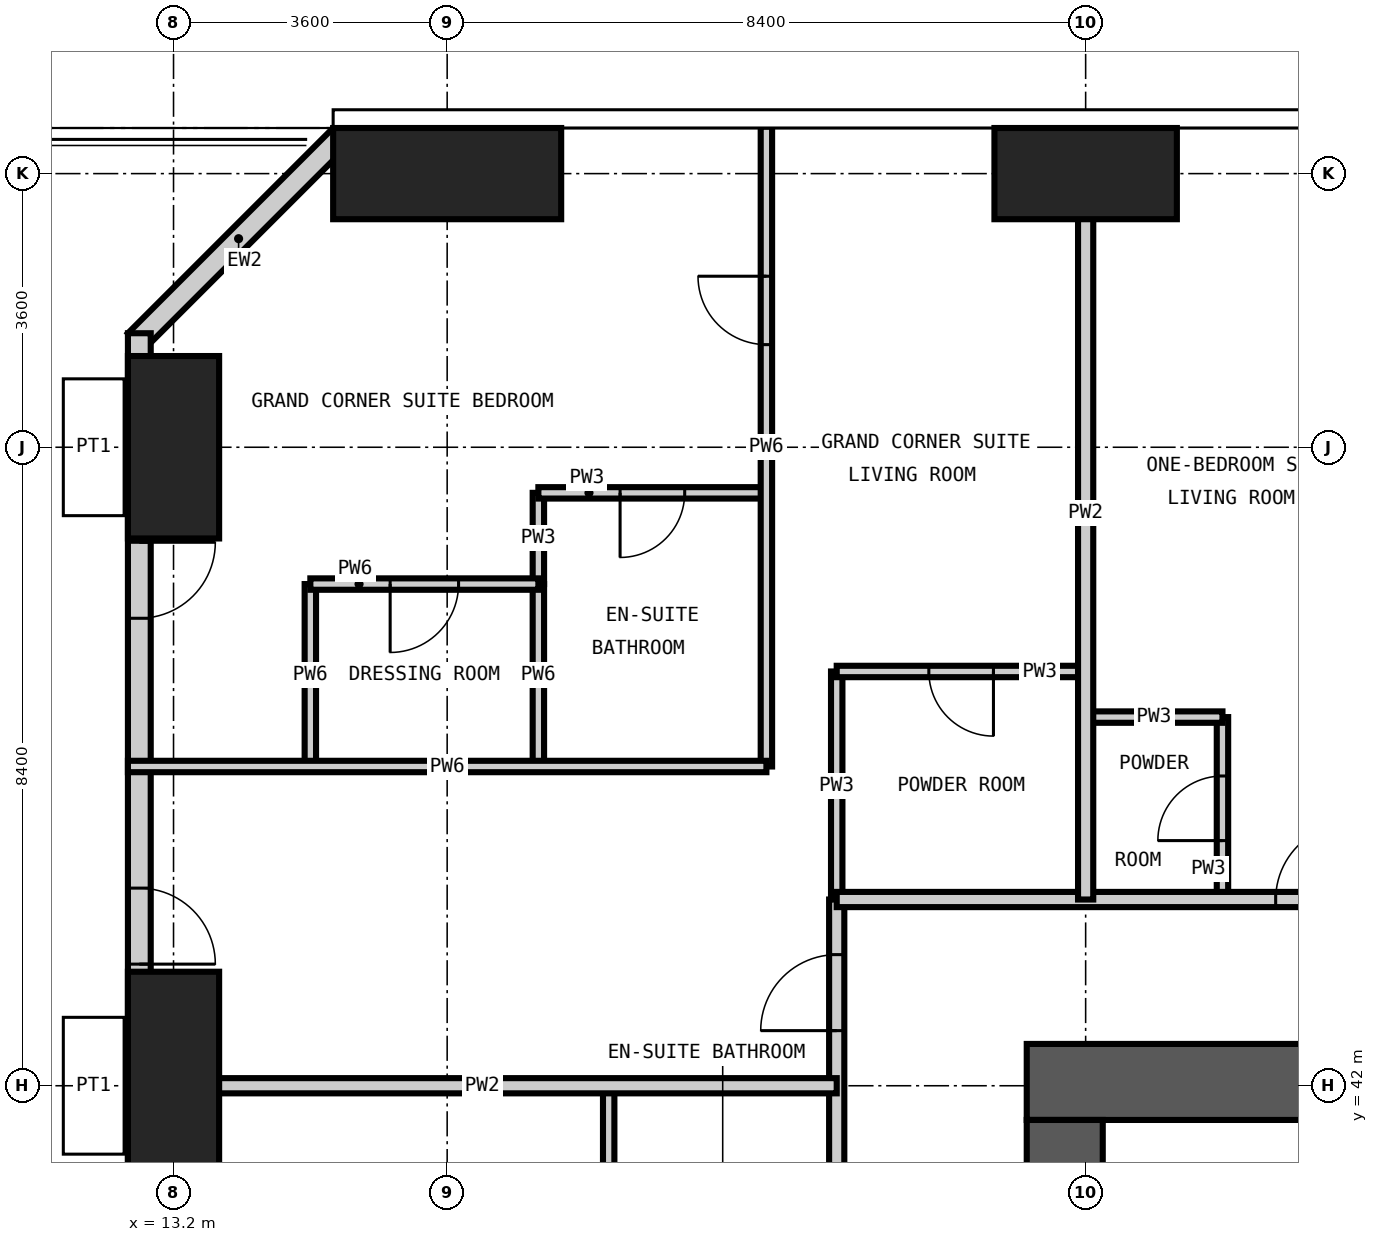
"""IFC4 building model, lengths in metres.
Left out: names, types, materials, properties, quantities, classifications, styles, units other than length and angle.
Written with IfcOpenShell. Run it as: python <this file> out.ifc"""

import sys

from ifc_helpers import new_model, si_unit, direction, frame, frame_2d, origin, origin_2d, place, context, subcontext, project, spatial, rectangle, extrude, element, fill, save


model = new_model("IFC4")
c1 = context("Model", 3, precision=1e-05, world=origin(), true_north=direction((0.0, 1.0)))
c2 = subcontext(c1, "Body", "Model", "MODEL_VIEW")
j1 = project(units=[si_unit("LENGTHUNIT", "METRE"), si_unit("PLANEANGLEUNIT", "RADIAN")], contexts=[c1])
p1 = place(None, origin())
s1 = spatial("IfcSite", under=j1, at=p1, CompositionType="ELEMENT")
p2 = place(p1, origin())
s2 = spatial("IfcBuilding", under=s1, at=p2, CompositionType="ELEMENT")
p3 = place(p2, frame((0.0, 0.0, 225.6)))
s3 = spatial("IfcBuildingStorey", under=s2, at=p3, CompositionType="ELEMENT", Elevation=225.6)
p4 = place(p3, frame((13.2, 42.0, -0.35), z_axis=(0.0, 0.0, 1.0), x_axis=(1.0, 0.0, 0.0)))
e1 = element("IfcColumn", 1, at=p4, inside=s3, PredefinedType="COLUMN", context=c2, shape_type="SweptSolid", body=[
    extrude(rectangle(XDim=1.2, YDim=3.0, at=origin_2d()), origin(), (0.0, 0.0, 1.0), 3.9),
])
p5 = place(p3, frame((13.2, 50.4, -0.35), z_axis=(0.0, 0.0, 1.0), x_axis=(1.0, 0.0, 0.0)))
e2 = element("IfcColumn", 2, at=p5, inside=s3, PredefinedType="COLUMN", context=c2, shape_type="SweptSolid", body=[
    extrude(rectangle(XDim=1.2, YDim=2.4, at=origin_2d()), origin(), (0.0, 0.0, 1.0), 3.9),
])
p6 = place(p3, frame((16.8, 54.0, -0.35), z_axis=(0.0, 0.0, 1.0), x_axis=(1.0, 0.0, 0.0)))
e3 = element("IfcColumn", 3, at=p6, inside=s3, PredefinedType="COLUMN", context=c2, shape_type="SweptSolid", body=[
    extrude(rectangle(XDim=3.0, YDim=1.2, at=origin_2d()), origin(), (0.0, 0.0, 1.0), 3.9),
])
p7 = place(p3, frame((25.2, 54.0, -0.35), z_axis=(0.0, 0.0, 1.0), x_axis=(1.0, 0.0, 0.0)))
e4 = element("IfcColumn", 4, at=p7, inside=s3, PredefinedType="COLUMN", context=c2, shape_type="SweptSolid", body=[
    extrude(rectangle(XDim=2.4, YDim=1.2, at=origin_2d()), origin(), (0.0, 0.0, 1.0), 3.9),
])
p8 = place(p3, frame((42.55, 42.05, -0.35), z_axis=(0.0, 0.0, 1.0), x_axis=(-1.0, 0.0, 0.0)))
e5 = element("IfcWall", 5, at=p8, inside=s3, PredefinedType="SHEAR", context=c2, shape_type="SweptSolid", body=[
    extrude(rectangle(XDim=18.125, YDim=1.0, at=frame_2d((9.062, 0.0))), origin(), (0.0, 0.0, 1.0), 3.9),
])
p9 = place(p8, frame((10.45, 0.0, 0.35)))
e6 = element("IfcOpeningElement", 6, at=p9, cuts=e5, PredefinedType="OPENING", context=c2, shape_type="SweptSolid", body=[
    extrude(rectangle(XDim=1.2, YDim=2.2, at=frame_2d((0.6, 1.1))), frame((0.0, 0.51, 0.0), z_axis=(0.0, -1.0, 0.0), x_axis=(1.0, 0.0, 0.0)), (0.0, 0.0, 1.0), 1.02),
])
p10 = place(p3, frame((24.925, 41.55, -0.35), z_axis=(0.0, 0.0, 1.0), x_axis=(0.0, -1.0, 0.0)))
e7 = element("IfcWall", 7, at=p10, inside=s3, PredefinedType="SHEAR", context=c2, shape_type="SweptSolid", body=[
    extrude(rectangle(XDim=24.3, YDim=1.0, at=frame_2d((12.15, 0.0))), origin(), (0.0, 0.0, 1.0), 3.9),
])
p11 = place(p10, frame((11.65, 0.0, 0.35)))
e8 = element("IfcOpeningElement", 8, at=p11, cuts=e7, PredefinedType="OPENING", context=c2, shape_type="SweptSolid", body=[
    extrude(rectangle(XDim=1.0, YDim=2.1, at=frame_2d((0.5, 1.05))), frame((0.0, 0.51, 0.0), z_axis=(0.0, -1.0, 0.0), x_axis=(1.0, 0.0, 0.0)), (0.0, 0.0, 1.0), 1.02),
])
p12 = place(p3, frame((15.406, 54.494, 0.0), z_axis=(0.0, 0.0, 1.0), x_axis=(-0.707106781187, -0.707106781187, 0.0)))
e9 = element("IfcWall", 9, at=p12, inside=s3, PredefinedType="SOLIDWALL", context=c2, shape_type="SweptSolid", body=[
    extrude(rectangle(XDim=3.818, YDim=0.3, at=frame_2d((1.909, 0.0))), origin(), (0.0, 0.0, 1.0), 3.55),
])
p13 = place(p3, frame((12.75, 51.9, 0.0), z_axis=(0.0, 0.0, 1.0), x_axis=(0.0, -1.0, 0.0)))
e10 = element("IfcWall", 10, at=p13, inside=s3, PredefinedType="SOLIDWALL", context=c2, shape_type="SweptSolid", body=[
    extrude(rectangle(XDim=45.0, YDim=0.3, at=frame_2d((22.5, 0.0))), origin(), (0.0, 0.0, 1.0), 3.1),
])
p14 = place(p13, frame((41.25, 0.0, 0.0)))
e11 = element("IfcOpeningElement", 11, at=p14, cuts=e10, PredefinedType="OPENING", context=c2, shape_type="SweptSolid", body=[
    extrude(rectangle(XDim=1.0, YDim=2.4, at=frame_2d((0.5, 1.2))), frame((0.0, 0.16, 0.0), z_axis=(0.0, -1.0, 0.0), x_axis=(1.0, 0.0, 0.0)), (0.0, 0.0, 1.0), 0.32),
])
p15 = place(p13, frame((36.7, 0.0, 0.0)))
e12 = element("IfcOpeningElement", 12, at=p15, cuts=e10, PredefinedType="OPENING", context=c2, shape_type="SweptSolid", body=[
    extrude(rectangle(XDim=1.0, YDim=2.4, at=frame_2d((0.5, 1.2))), frame((0.0, 0.16, 0.0), z_axis=(0.0, -1.0, 0.0), x_axis=(1.0, 0.0, 0.0)), (0.0, 0.0, 1.0), 0.32),
])
p16 = place(p13, frame((30.4, 0.0, 0.0)))
e13 = element("IfcOpeningElement", 13, at=p16, cuts=e10, PredefinedType="OPENING", context=c2, shape_type="SweptSolid", body=[
    extrude(rectangle(XDim=1.0, YDim=2.4, at=frame_2d((0.5, 1.2))), frame((0.0, 0.16, 0.0), z_axis=(0.0, -1.0, 0.0), x_axis=(1.0, 0.0, 0.0)), (0.0, 0.0, 1.0), 0.32),
])
p17 = place(p13, frame((31.7, 0.0, 0.6)))
e14 = element("IfcOpeningElement", 14, at=p17, cuts=e10, PredefinedType="OPENING", context=c2, shape_type="SweptSolid", body=[
    extrude(rectangle(XDim=1.8, YDim=2.1, at=frame_2d((0.9, 1.05))), frame((0.0, 0.16, 0.0), z_axis=(0.0, -1.0, 0.0), x_axis=(1.0, 0.0, 0.0)), (0.0, 0.0, 1.0), 0.32),
])
p18 = place(p13, frame((28.0, 0.0, 0.6)))
e15 = element("IfcOpeningElement", 15, at=p18, cuts=e10, PredefinedType="OPENING", context=c2, shape_type="SweptSolid", body=[
    extrude(rectangle(XDim=1.8, YDim=2.1, at=frame_2d((0.9, 1.05))), frame((0.0, 0.16, 0.0), z_axis=(0.0, -1.0, 0.0), x_axis=(1.0, 0.0, 0.0)), (0.0, 0.0, 1.0), 0.32),
])
p19 = place(p13, frame((24.1, 0.0, 0.0)))
e16 = element("IfcOpeningElement", 16, at=p19, cuts=e10, PredefinedType="OPENING", context=c2, shape_type="SweptSolid", body=[
    extrude(rectangle(XDim=1.0, YDim=2.4, at=frame_2d((0.5, 1.2))), frame((0.0, 0.16, 0.0), z_axis=(0.0, -1.0, 0.0), x_axis=(1.0, 0.0, 0.0)), (0.0, 0.0, 1.0), 0.32),
])
p20 = place(p13, frame((19.9, 0.0, 0.0)))
e17 = element("IfcOpeningElement", 17, at=p20, cuts=e10, PredefinedType="OPENING", context=c2, shape_type="SweptSolid", body=[
    extrude(rectangle(XDim=1.0, YDim=2.4, at=frame_2d((0.5, 1.2))), frame((0.0, 0.16, 0.0), z_axis=(0.0, -1.0, 0.0), x_axis=(1.0, 0.0, 0.0)), (0.0, 0.0, 1.0), 0.32),
])
p21 = place(p13, frame((15.7, 0.0, 0.0)))
e18 = element("IfcOpeningElement", 18, at=p21, cuts=e10, PredefinedType="OPENING", context=c2, shape_type="SweptSolid", body=[
    extrude(rectangle(XDim=1.0, YDim=2.4, at=frame_2d((0.5, 1.2))), frame((0.0, 0.16, 0.0), z_axis=(0.0, -1.0, 0.0), x_axis=(1.0, 0.0, 0.0)), (0.0, 0.0, 1.0), 0.32),
])
p22 = place(p13, frame((11.5, 0.0, 0.0)))
e19 = element("IfcOpeningElement", 19, at=p22, cuts=e10, PredefinedType="OPENING", context=c2, shape_type="SweptSolid", body=[
    extrude(rectangle(XDim=1.0, YDim=2.4, at=frame_2d((0.5, 1.2))), frame((0.0, 0.16, 0.0), z_axis=(0.0, -1.0, 0.0), x_axis=(1.0, 0.0, 0.0)), (0.0, 0.0, 1.0), 0.32),
])
p23 = place(p13, frame((7.3, 0.0, 0.0)))
e20 = element("IfcOpeningElement", 20, at=p23, cuts=e10, PredefinedType="OPENING", context=c2, shape_type="SweptSolid", body=[
    extrude(rectangle(XDim=1.0, YDim=2.4, at=frame_2d((0.5, 1.2))), frame((0.0, 0.16, 0.0), z_axis=(0.0, -1.0, 0.0), x_axis=(1.0, 0.0, 0.0)), (0.0, 0.0, 1.0), 0.32),
])
p24 = place(p13, frame((2.75, 0.0, 0.0)))
e21 = element("IfcOpeningElement", 21, at=p24, cuts=e10, PredefinedType="OPENING", context=c2, shape_type="SweptSolid", body=[
    extrude(rectangle(XDim=1.0, YDim=2.4, at=frame_2d((0.5, 1.2))), frame((0.0, 0.16, 0.0), z_axis=(0.0, -1.0, 0.0), x_axis=(1.0, 0.0, 0.0)), (0.0, 0.0, 1.0), 0.32),
])
p25 = place(p3, frame((18.0, 48.6, 0.0), z_axis=(0.0, 0.0, 1.0), x_axis=(0.0, 1.0, 0.0)))
e22 = element("IfcWall", 22, at=p25, inside=s3, PredefinedType="PARTITIONING", context=c2, shape_type="SweptSolid", body=[
    extrude(rectangle(XDim=1.2, YDim=0.15, at=frame_2d((0.6, 0.0))), origin(), (0.0, 0.0, 1.0), 3.55),
])
p26 = place(p3, frame((18.925, 39.6, 0.0), z_axis=(0.0, 0.0, 1.0), x_axis=(0.0, 1.0, 0.0)))
e23 = element("IfcWall", 23, at=p26, inside=s3, PredefinedType="PARTITIONING", context=c2, shape_type="SweptSolid", body=[
    extrude(rectangle(XDim=2.4, YDim=0.15, at=frame_2d((1.2, 0.0))), origin(), (0.0, 0.0, 1.0), 3.55),
])
p27 = place(p3, frame((21.925, 44.45, 0.0), z_axis=(0.0, 0.0, 1.0), x_axis=(0.0, 1.0, 0.0)))
e24 = element("IfcWall", 24, at=p27, inside=s3, PredefinedType="PARTITIONING", context=c2, shape_type="SweptSolid", body=[
    extrude(rectangle(XDim=3.0, YDim=0.15, at=frame_2d((1.5, 0.0))), origin(), (0.0, 0.0, 1.0), 3.55),
])
p28 = place(p3, frame((27.0, 44.45, 0.0), z_axis=(0.0, 0.0, 1.0), x_axis=(0.0, 1.0, 0.0)))
e25 = element("IfcWall", 25, at=p28, inside=s3, PredefinedType="PARTITIONING", context=c2, shape_type="SweptSolid", body=[
    extrude(rectangle(XDim=2.4, YDim=0.15, at=frame_2d((1.2, 0.0))), origin(), (0.0, 0.0, 1.0), 3.55),
])
p29 = place(p28, frame((0.775, 0.0, 0.0)))
e26 = element("IfcOpeningElement", 26, at=p29, cuts=e25, PredefinedType="OPENING", context=c2, shape_type="SweptSolid", body=[
    extrude(rectangle(XDim=0.85, YDim=2.1, at=frame_2d((0.425, 1.05))), frame((0.0, 0.085, 0.0), z_axis=(0.0, -1.0, 0.0), x_axis=(1.0, 0.0, 0.0)), (0.0, 0.0, 1.0), 0.17),
])
p30 = place(p3, frame((25.2, 46.85, 0.0), z_axis=(0.0, 0.0, 1.0), x_axis=(1.0, 0.0, 0.0)))
e27 = element("IfcWall", 27, at=p30, inside=s3, PredefinedType="PARTITIONING", context=c2, shape_type="SweptSolid", body=[
    extrude(rectangle(XDim=1.8, YDim=0.15, at=frame_2d((0.9, 0.0))), origin(), (0.0, 0.0, 1.0), 3.55),
])
p31 = place(p3, frame((21.925, 47.45, 0.0), z_axis=(0.0, 0.0, 1.0), x_axis=(1.0, 0.0, 0.0)))
e28 = element("IfcWall", 28, at=p31, inside=s3, PredefinedType="PARTITIONING", context=c2, shape_type="SweptSolid", body=[
    extrude(rectangle(XDim=3.275, YDim=0.15, at=frame_2d((1.637, 0.0))), origin(), (0.0, 0.0, 1.0), 3.55),
])
p32 = place(p31, frame((1.212, 0.0, 0.0)))
e29 = element("IfcOpeningElement", 29, at=p32, cuts=e28, PredefinedType="OPENING", context=c2, shape_type="SweptSolid", body=[
    extrude(rectangle(XDim=0.85, YDim=2.1, at=frame_2d((0.425, 1.05))), frame((0.0, 0.085, 0.0), z_axis=(0.0, -1.0, 0.0), x_axis=(1.0, 0.0, 0.0)), (0.0, 0.0, 1.0), 0.17),
])
p33 = place(p3, frame((18.0, 49.8, 0.0), z_axis=(0.0, 0.0, 1.0), x_axis=(1.0, 0.0, 0.0)))
e30 = element("IfcWall", 30, at=p33, inside=s3, PredefinedType="PARTITIONING", context=c2, shape_type="SweptSolid", body=[
    extrude(rectangle(XDim=3.0, YDim=0.15, at=frame_2d((1.5, 0.0))), origin(), (0.0, 0.0, 1.0), 3.55),
])
p34 = place(p33, frame((1.075, 0.0, 0.0)))
e31 = element("IfcOpeningElement", 31, at=p34, cuts=e30, PredefinedType="OPENING", context=c2, shape_type="SweptSolid", body=[
    extrude(rectangle(XDim=0.85, YDim=2.1, at=frame_2d((0.425, 1.05))), frame((0.0, 0.085, 0.0), z_axis=(0.0, -1.0, 0.0), x_axis=(1.0, 0.0, 0.0)), (0.0, 0.0, 1.0), 0.17),
])
p35 = place(p3, frame((21.925, 25.2, 0.0), z_axis=(0.0, 0.0, 1.0), x_axis=(0.0, 1.0, 0.0)))
e32 = element("IfcWall", 32, at=p35, inside=s3, PredefinedType="PARTITIONING", context=c2, shape_type="SweptSolid", body=[
    extrude(rectangle(XDim=19.25, YDim=0.2, at=frame_2d((9.625, 0.0))), origin(), (0.0, 0.0, 1.0), 3.55),
])
p36 = place(p35, frame((4.9, 0.0, 0.0)))
e33 = element("IfcOpeningElement", 33, at=p36, cuts=e32, PredefinedType="OPENING", context=c2, shape_type="SweptSolid", body=[
    extrude(rectangle(XDim=1.0, YDim=2.2, at=frame_2d((0.5, 1.1))), frame((0.0, 0.11, 0.0), z_axis=(0.0, -1.0, 0.0), x_axis=(1.0, 0.0, 0.0)), (0.0, 0.0, 1.0), 0.22),
])
p37 = place(p35, frame((10.9, 0.0, 0.0)))
e34 = element("IfcOpeningElement", 34, at=p37, cuts=e32, PredefinedType="OPENING", context=c2, shape_type="SweptSolid", body=[
    extrude(rectangle(XDim=1.0, YDim=2.2, at=frame_2d((0.5, 1.1))), frame((0.0, 0.11, 0.0), z_axis=(0.0, -1.0, 0.0), x_axis=(1.0, 0.0, 0.0)), (0.0, 0.0, 1.0), 0.22),
])
p38 = place(p35, frame((17.525, 0.0, 0.0)))
e35 = element("IfcOpeningElement", 35, at=p38, cuts=e32, PredefinedType="OPENING", context=c2, shape_type="SweptSolid", body=[
    extrude(rectangle(XDim=1.0, YDim=2.2, at=frame_2d((0.5, 1.1))), frame((0.0, 0.11, 0.0), z_axis=(0.0, -1.0, 0.0), x_axis=(1.0, 0.0, 0.0)), (0.0, 0.0, 1.0), 0.22),
])
p39 = place(p3, frame((21.925, 44.45, 0.0), z_axis=(0.0, 0.0, 1.0), x_axis=(1.0, 0.0, 0.0)))
e36 = element("IfcWall", 36, at=p39, inside=s3, PredefinedType="PARTITIONING", context=c2, shape_type="SweptSolid", body=[
    extrude(rectangle(XDim=23.725, YDim=0.2, at=frame_2d((11.862, 0.0))), origin(), (0.0, 0.0, 1.0), 3.55),
])
p40 = place(p39, frame((5.775, 0.0, 0.0)))
e37 = element("IfcOpeningElement", 37, at=p40, cuts=e36, PredefinedType="OPENING", context=c2, shape_type="SweptSolid", body=[
    extrude(rectangle(XDim=1.0, YDim=2.2, at=frame_2d((0.5, 1.1))), frame((0.0, 0.11, 0.0), z_axis=(0.0, -1.0, 0.0), x_axis=(1.0, 0.0, 0.0)), (0.0, 0.0, 1.0), 0.22),
])
p41 = place(p39, frame((16.575, 0.0, 0.0)))
e38 = element("IfcOpeningElement", 38, at=p41, cuts=e36, PredefinedType="OPENING", context=c2, shape_type="SweptSolid", body=[
    extrude(rectangle(XDim=1.0, YDim=2.2, at=frame_2d((0.5, 1.1))), frame((0.0, 0.11, 0.0), z_axis=(0.0, -1.0, 0.0), x_axis=(1.0, 0.0, 0.0)), (0.0, 0.0, 1.0), 0.22),
])
p42 = place(p3, frame((25.2, 44.45, 0.0), z_axis=(0.0, 0.0, 1.0), x_axis=(0.0, 1.0, 0.0)))
e39 = element("IfcWall", 39, at=p42, inside=s3, PredefinedType="PARTITIONING", context=c2, shape_type="SweptSolid", body=[
    extrude(rectangle(XDim=10.168, YDim=0.2, at=frame_2d((5.084, 0.0))), origin(), (0.0, 0.0, 1.0), 3.55),
])
p43 = place(p3, frame((12.6, 42.0, 0.0), z_axis=(0.0, 0.0, 1.0), x_axis=(1.0, 0.0, 0.0)))
e40 = element("IfcWall", 40, at=p43, inside=s3, PredefinedType="PARTITIONING", context=c2, shape_type="SweptSolid", body=[
    extrude(rectangle(XDim=9.325, YDim=0.2, at=frame_2d((4.663, 0.0))), origin(), (0.0, 0.0, 1.0), 3.55),
])
for number, where, z_axis, x_axis in (
    (41, (15.0, 46.2, 0.0), (0.0, 0.0, 1.0), (0.0, 1.0, 0.0)),
    (42, (18.0, 46.2, 0.0), (0.0, 0.0, 1.0), (0.0, 1.0, 0.0)),
):
    element("IfcWall", number, at=place(p3, frame(where, z_axis=z_axis, x_axis=x_axis)), inside=s3, PredefinedType="PARTITIONING", context=c2, shape_type="SweptSolid", body=[
        extrude(rectangle(XDim=2.4, YDim=0.15, at=frame_2d((1.2, 0.0))), origin(), (0.0, 0.0, 1.0), 3.55),
    ])
p44 = place(p3, frame((21.0, 46.2, 0.0), z_axis=(0.0, 0.0, 1.0), x_axis=(0.0, 1.0, 0.0)))
e43 = element("IfcWall", 43, at=p44, inside=s3, PredefinedType="PARTITIONING", context=c2, shape_type="SweptSolid", body=[
    extrude(rectangle(XDim=8.418, YDim=0.15, at=frame_2d((4.209, 0.0))), origin(), (0.0, 0.0, 1.0), 3.55),
])
p45 = place(p44, frame((5.55, 0.0, 0.0)))
e44 = element("IfcOpeningElement", 44, at=p45, cuts=e43, PredefinedType="OPENING", context=c2, shape_type="SweptSolid", body=[
    extrude(rectangle(XDim=0.9, YDim=2.1, at=frame_2d((0.45, 1.05))), frame((0.0, 0.085, 0.0), z_axis=(0.0, -1.0, 0.0), x_axis=(1.0, 0.0, 0.0)), (0.0, 0.0, 1.0), 0.17),
])
p46 = place(p3, frame((12.6, 46.2, 0.0), z_axis=(0.0, 0.0, 1.0), x_axis=(1.0, 0.0, 0.0)))
e45 = element("IfcWall", 45, at=p46, inside=s3, PredefinedType="PARTITIONING", context=c2, shape_type="SweptSolid", body=[
    extrude(rectangle(XDim=8.4, YDim=0.15, at=frame_2d((4.2, 0.0))), origin(), (0.0, 0.0, 1.0), 3.55),
])
p47 = place(p3, frame((15.0, 48.6, 0.0), z_axis=(0.0, 0.0, 1.0), x_axis=(1.0, 0.0, 0.0)))
e46 = element("IfcWall", 46, at=p47, inside=s3, PredefinedType="PARTITIONING", context=c2, shape_type="SweptSolid", body=[
    extrude(rectangle(XDim=3.0, YDim=0.15, at=frame_2d((1.5, 0.0))), origin(), (0.0, 0.0, 1.0), 3.55),
])
p48 = place(p47, frame((1.05, 0.0, 0.0)))
e47 = element("IfcOpeningElement", 47, at=p48, cuts=e46, PredefinedType="OPENING", context=c2, shape_type="SweptSolid", body=[
    extrude(rectangle(XDim=0.9, YDim=2.1, at=frame_2d((0.45, 1.05))), frame((0.0, 0.085, 0.0), z_axis=(0.0, -1.0, 0.0), x_axis=(1.0, 0.0, 0.0)), (0.0, 0.0, 1.0), 0.17),
])
p49 = place(p23, origin())
e48 = element("IfcDoor", 48, at=p49, inside=s3, OperationType="SINGLE_SWING_RIGHT", PredefinedType="DOOR", context=c2, shape_type="SweptSolid", body=[
    extrude(rectangle(XDim=1.0, YDim=2.4, at=frame_2d((0.5, 1.2))), frame((0.0, 0.025, 0.0), z_axis=(0.0, -1.0, 0.0), x_axis=(1.0, 0.0, 0.0)), (0.0, 0.0, 1.0), 0.05),
])
fill(e20, e48)
p50 = place(p24, origin())
e49 = element("IfcDoor", 49, at=p50, inside=s3, OperationType="SINGLE_SWING_LEFT", PredefinedType="DOOR", context=c2, shape_type="SweptSolid", body=[
    extrude(rectangle(XDim=1.0, YDim=2.4, at=frame_2d((0.5, 1.2))), frame((0.0, 0.025, 0.0), z_axis=(0.0, -1.0, 0.0), x_axis=(1.0, 0.0, 0.0)), (0.0, 0.0, 1.0), 0.05),
])
fill(e21, e49)
p51 = place(p40, origin())
e50 = element("IfcDoor", 50, at=p51, inside=s3, OperationType="SINGLE_SWING_RIGHT", PredefinedType="DOOR", context=c2, shape_type="SweptSolid", body=[
    extrude(rectangle(XDim=1.0, YDim=2.2, at=frame_2d((0.5, 1.1))), frame((0.0, 0.025, 0.0), z_axis=(0.0, -1.0, 0.0), x_axis=(1.0, 0.0, 0.0)), (0.0, 0.0, 1.0), 0.05),
])
fill(e37, e50)
p52 = place(p29, origin())
e51 = element("IfcDoor", 51, at=p52, inside=s3, OperationType="SINGLE_SWING_LEFT", PredefinedType="DOOR", context=c2, shape_type="SweptSolid", body=[
    extrude(rectangle(XDim=0.85, YDim=2.1, at=frame_2d((0.425, 1.05))), frame((0.0, 0.025, 0.0), z_axis=(0.0, -1.0, 0.0), x_axis=(1.0, 0.0, 0.0)), (0.0, 0.0, 1.0), 0.05),
])
fill(e26, e51)
p53 = place(p38, origin())
e52 = element("IfcDoor", 52, at=p53, inside=s3, OperationType="SINGLE_SWING_LEFT", PredefinedType="DOOR", context=c2, shape_type="SweptSolid", body=[
    extrude(rectangle(XDim=1.0, YDim=2.2, at=frame_2d((0.5, 1.1))), frame((0.0, 0.025, 0.0), z_axis=(0.0, -1.0, 0.0), x_axis=(1.0, 0.0, 0.0)), (0.0, 0.0, 1.0), 0.05),
])
fill(e35, e52)
p54 = place(p32, frame((0.85, 0.0, 0.0), z_axis=(0.0, 0.0, 1.0), x_axis=(-1.0, 0.0, 0.0)))
e53 = element("IfcDoor", 53, at=p54, inside=s3, OperationType="SINGLE_SWING_LEFT", PredefinedType="DOOR", context=c2, shape_type="SweptSolid", body=[
    extrude(rectangle(XDim=0.85, YDim=2.1, at=frame_2d((0.425, 1.05))), frame((0.0, 0.025, 0.0), z_axis=(0.0, -1.0, 0.0), x_axis=(1.0, 0.0, 0.0)), (0.0, 0.0, 1.0), 0.05),
])
fill(e29, e53)
p55 = place(p45, origin())
e54 = element("IfcDoor", 54, at=p55, inside=s3, OperationType="SINGLE_SWING_RIGHT", PredefinedType="DOOR", context=c2, shape_type="SweptSolid", body=[
    extrude(rectangle(XDim=0.9, YDim=2.1, at=frame_2d((0.45, 1.05))), frame((0.0, 0.025, 0.0), z_axis=(0.0, -1.0, 0.0), x_axis=(1.0, 0.0, 0.0)), (0.0, 0.0, 1.0), 0.05),
])
fill(e44, e54)
p56 = place(p34, frame((0.85, 0.0, 0.0), z_axis=(0.0, 0.0, 1.0), x_axis=(-1.0, 0.0, 0.0)))
e55 = element("IfcDoor", 55, at=p56, inside=s3, OperationType="SINGLE_SWING_RIGHT", PredefinedType="DOOR", context=c2, shape_type="SweptSolid", body=[
    extrude(rectangle(XDim=0.85, YDim=2.1, at=frame_2d((0.425, 1.05))), frame((0.0, 0.025, 0.0), z_axis=(0.0, -1.0, 0.0), x_axis=(1.0, 0.0, 0.0)), (0.0, 0.0, 1.0), 0.05),
])
fill(e31, e55)
p57 = place(p48, frame((0.9, 0.0, 0.0), z_axis=(0.0, 0.0, 1.0), x_axis=(-1.0, 0.0, 0.0)))
e56 = element("IfcDoor", 56, at=p57, inside=s3, OperationType="SINGLE_SWING_RIGHT", PredefinedType="DOOR", context=c2, shape_type="SweptSolid", body=[
    extrude(rectangle(XDim=0.9, YDim=2.1, at=frame_2d((0.45, 1.05))), frame((0.0, 0.025, 0.0), z_axis=(0.0, -1.0, 0.0), x_axis=(1.0, 0.0, 0.0)), (0.0, 0.0, 1.0), 0.05),
])
fill(e47, e56)
save(model, sys.argv[1])
